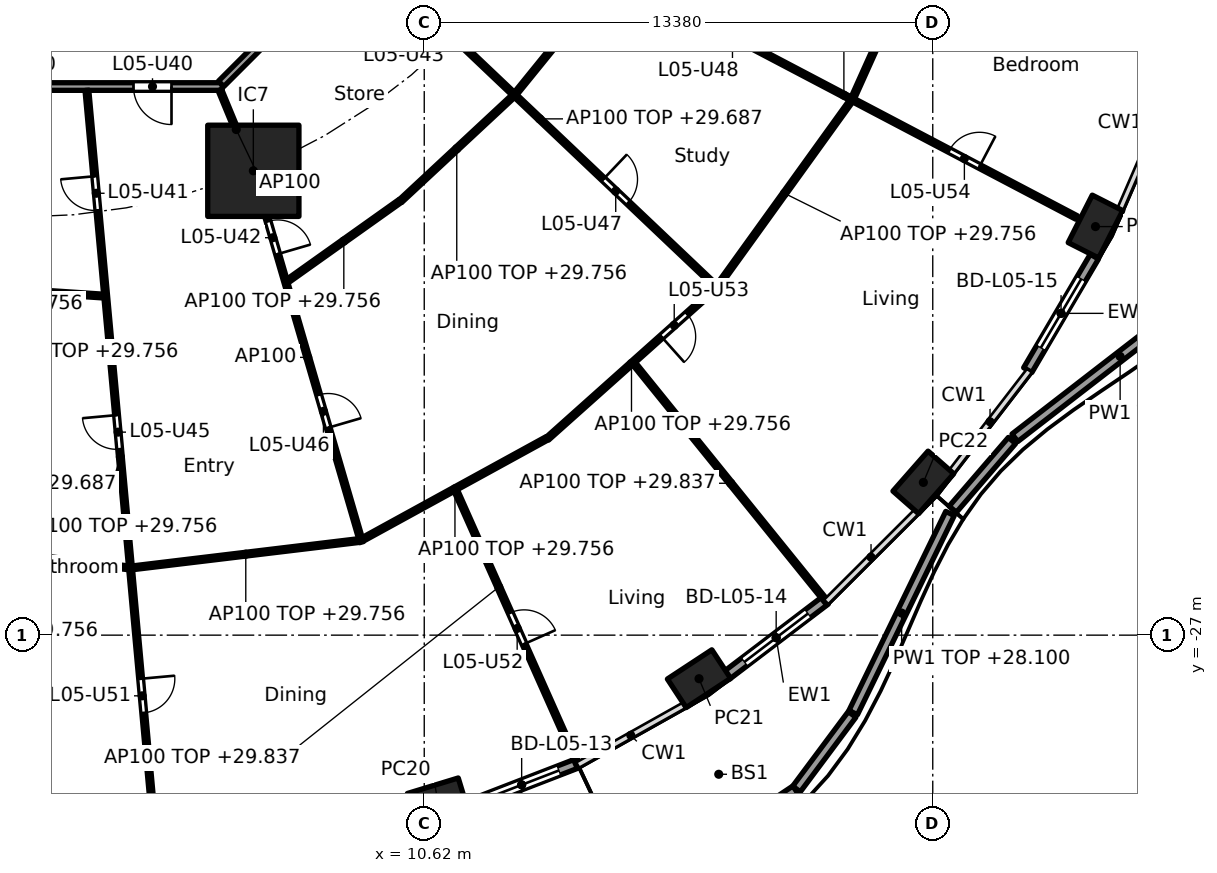
"""IFC4 building model, lengths in metres.
Left out: names, types, materials, properties, quantities, classifications, styles, units other than length and angle.
Written with IfcOpenShell. Run it as: python <this file> out.ifc"""

import sys

from ifc_helpers import new_model, si_unit, direction, frame, frame_2d, origin, origin_2d, place, context, subcontext, project, spatial, rectangle, hollow_rectangle, extrude, element, fill, save


model = new_model("IFC4")
c1 = context("Model", 3, precision=1e-05, world=origin(), true_north=direction((0.0, 1.0)))
c2 = subcontext(c1, "Body", "Model", "MODEL_VIEW")
j1 = project(units=[si_unit("LENGTHUNIT", "METRE"), si_unit("PLANEANGLEUNIT", "RADIAN")], contexts=[c1])
p1 = place(None, origin())
s1 = spatial("IfcSite", under=j1, at=p1, CompositionType="ELEMENT")
p2 = place(p1, origin())
s2 = spatial("IfcBuilding", under=s1, at=p2, CompositionType="ELEMENT")
p3 = place(p2, frame((0.0, 0.0, 27.0)))
s3 = spatial("IfcBuildingStorey", under=s2, at=p3, CompositionType="ELEMENT", Elevation=27.0)
for number, where, z_axis, x_axis in (
    (1, (10.976, -31.393, 0.0), (0.0, 0.0, 1.0), (0.957, 0.292, 0.0)),
    (2, (17.85, -28.146, 0.0), (0.0, 0.0, 1.0), (0.836, 0.549, 0.0)),
    (3, (23.752, -22.981, 0.0), (0.0, 0.0, 1.0), (0.66, 0.751, 0.0)),
    (4, (28.282, -16.25, 0.0), (0.0, 0.0, 1.0), (0.452, 0.892, 0.0)),
):
    element("IfcColumn", number, at=place(p3, frame(where, z_axis=z_axis, x_axis=x_axis)), inside=s3, PredefinedType="COLUMN", context=c2, shape_type="SweptSolid", body=[
        extrude(hollow_rectangle(XDim=1.4, YDim=0.9, WallThickness=0.05, at=origin_2d()), origin(), (0.0, 0.0, 1.0), 3.7),
    ])
p4 = place(p3, frame((6.123, -14.782, 0.0), z_axis=(0.0, 0.0, 1.0), x_axis=(1.0, 0.0, 0.0)))
e5 = element("IfcColumn", 5, at=p4, inside=s3, PredefinedType="COLUMN", context=c2, shape_type="SweptSolid", body=[
    extrude(rectangle(XDim=2.4, YDim=2.4, at=origin_2d()), origin(), (0.0, 0.0, 1.0), 3.7),
])
p5 = place(p3, frame((14.653, -30.371, 0.0), z_axis=(0.0, 0.0, 1.0), x_axis=(-0.932809381943, -0.360370166577, 0.0)))
e6 = element("IfcWall", 6, at=p5, inside=s3, PredefinedType="SOLIDWALL", context=c2, shape_type="SweptSolid", body=[
    extrude(rectangle(XDim=3.151, YDim=0.25, at=frame_2d((1.575, 0.0))), origin(), (0.0, 0.0, 1.0), 3.44),
])
p6 = place(p5, frame((0.525, 0.0, 0.0)))
e7 = element("IfcOpeningElement", 7, at=p6, cuts=e6, PredefinedType="OPENING", context=c2, shape_type="SweptSolid", body=[
    extrude(rectangle(XDim=2.1, YDim=2.4, at=frame_2d((1.05, 1.2))), frame((0.0, 0.135, 0.0), z_axis=(0.0, -1.0, 0.0), x_axis=(1.0, 0.0, 0.0)), (0.0, 0.0, 1.0), 0.27),
])
p7 = place(p3, frame((21.178, -26.081, 0.0), z_axis=(0.0, 0.0, 1.0), x_axis=(-0.796022293214, -0.605267303517, 0.0)))
e8 = element("IfcWall", 8, at=p7, inside=s3, PredefinedType="SOLIDWALL", context=c2, shape_type="SweptSolid", body=[
    extrude(rectangle(XDim=3.262, YDim=0.25, at=frame_2d((1.631, 0.0))), origin(), (0.0, 0.0, 1.0), 3.44),
])
p8 = place(p7, frame((0.581, 0.0, 0.0)))
e9 = element("IfcOpeningElement", 9, at=p8, cuts=e8, PredefinedType="OPENING", context=c2, shape_type="SweptSolid", body=[
    extrude(rectangle(XDim=2.1, YDim=2.4, at=frame_2d((1.05, 1.2))), frame((0.0, 0.135, 0.0), z_axis=(0.0, -1.0, 0.0), x_axis=(1.0, 0.0, 0.0)), (0.0, 0.0, 1.0), 0.27),
])
p9 = place(p3, frame((28.252, -17.04, 0.0), z_axis=(0.0, 0.0, 1.0), x_axis=(-0.506311160839, -0.862350861546, 0.0)))
e10 = element("IfcWall", 10, at=p9, inside=s3, PredefinedType="SOLIDWALL", context=c2, shape_type="SweptSolid", body=[
    extrude(rectangle(XDim=3.462, YDim=0.25, at=frame_2d((1.731, 0.0))), origin(), (0.0, 0.0, 1.0), 3.44),
])
p10 = place(p9, frame((0.681, 0.0, 0.0)))
e11 = element("IfcOpeningElement", 11, at=p10, cuts=e10, PredefinedType="OPENING", context=c2, shape_type="SweptSolid", body=[
    extrude(rectangle(XDim=2.1, YDim=2.4, at=frame_2d((1.05, 1.2))), frame((0.0, 0.135, 0.0), z_axis=(0.0, -1.0, 0.0), x_axis=(1.0, 0.0, 0.0)), (0.0, 0.0, 1.0), 0.27),
])
p11 = place(p3, frame((18.428, -32.379, 0.0), z_axis=(0.0, 0.0, 1.0), x_axis=(0.832193744061, 0.554484961334, 0.0)))
e12 = element("IfcWall", 12, at=p11, inside=s3, PredefinedType="PARAPET", context=c2, shape_type="SweptSolid", body=[
    extrude(rectangle(XDim=2.356, YDim=0.25, at=frame_2d((1.178, 0.0))), origin(), (0.0, 0.0, 1.0), 1.1),
])
p12 = place(p3, frame((20.415, -31.048, 0.0), z_axis=(0.0, 0.0, 1.0), x_axis=(0.597715227752, 0.80170849223, 0.0)))
e13 = element("IfcWall", 13, at=p12, inside=s3, PredefinedType="PARAPET", context=c2, shape_type="SweptSolid", body=[
    extrude(rectangle(XDim=2.448, YDim=0.25, at=frame_2d((1.224, 0.0))), origin(), (0.0, 0.0, 1.0), 1.1),
])
p13 = place(p3, frame((21.907, -29.038, 0.0), z_axis=(0.0, 0.0, 1.0), x_axis=(0.437296277374, 0.899317499994, 0.0)))
e14 = element("IfcWall", 14, at=p13, inside=s3, PredefinedType="PARAPET", context=c2, shape_type="SweptSolid", body=[
    extrude(rectangle(XDim=5.826, YDim=0.25, at=frame_2d((2.913, 0.0))), origin(), (0.0, 0.0, 1.0), 1.1),
])
p14 = place(p3, frame((24.527, -23.688, 0.0), z_axis=(0.0, 0.0, 1.0), x_axis=(0.652642199991, 0.757666258184, 0.0)))
e15 = element("IfcWall", 15, at=p14, inside=s3, PredefinedType="PARAPET", context=c2, shape_type="SweptSolid", body=[
    extrude(rectangle(XDim=2.387, YDim=0.25, at=frame_2d((1.194, 0.0))), origin(), (0.0, 0.0, 1.0), 1.1),
])
p15 = place(p3, frame((26.161, -21.807, 0.0), z_axis=(0.0, 0.0, 1.0), x_axis=(0.791260452579, 0.611479268811, 0.0)))
e16 = element("IfcWall", 16, at=p15, inside=s3, PredefinedType="PARAPET", context=c2, shape_type="SweptSolid", body=[
    extrude(rectangle(XDim=6.999, YDim=0.25, at=frame_2d((3.5, 0.0))), origin(), (0.0, 0.0, 1.0), 1.1),
])
p16 = place(p3, frame((-5.104, -12.565, 0.0), z_axis=(0.0, 0.0, 1.0), x_axis=(1.0, 0.0, 0.0)))
e17 = element("IfcWall", 17, at=p16, inside=s3, PredefinedType="PARTITIONING", context=c2, shape_type="SweptSolid", body=[
    extrude(rectangle(XDim=10.409, YDim=0.2, at=frame_2d((5.205, 0.0))), origin(), (0.0, 0.0, 1.0), 3.44),
])
p17 = place(p16, frame((8.074, 0.0, 0.0)))
e18 = element("IfcOpeningElement", 18, at=p17, cuts=e17, PredefinedType="OPENING", context=c2, shape_type="SweptSolid", body=[
    extrude(rectangle(XDim=1.0, YDim=2.1, at=frame_2d((0.5, 1.05))), frame((0.0, 0.11, 0.0), z_axis=(0.0, -1.0, 0.0), x_axis=(1.0, 0.0, 0.0)), (0.0, 0.0, 1.0), 0.22),
])
p18 = place(p3, frame((5.275, -12.494, 0.0), z_axis=(0.0, 0.0, 1.0), x_axis=(0.707106781187, 0.707106781187, 0.0)))
e19 = element("IfcWall", 19, at=p18, inside=s3, PredefinedType="PARTITIONING", context=c2, shape_type="SweptSolid", body=[
    extrude(rectangle(XDim=10.409, YDim=0.2, at=frame_2d((5.205, 0.0))), origin(), (0.0, 0.0, 1.0), 3.44),
])
p19 = place(p3, frame((-2.271, -17.782, 0.0), z_axis=(0.0, 0.0, 1.0), x_axis=(0.997791437766, -0.066424744789, 0.0)))
e20 = element("IfcWall", 20, at=p19, inside=s3, PredefinedType="PARTITIONING", context=c2, shape_type="SweptSolid", body=[
    extrude(rectangle(XDim=4.469, YDim=0.1, at=frame_2d((2.235, 0.0))), origin(), (0.0, 0.0, 1.0), 2.756),
])
p20 = place(p3, frame((-3.031, -24.543, 0.0), z_axis=(0.0, 0.0, 1.0), x_axis=(0.993255612046, -0.115945198862, 0.0)))
e21 = element("IfcWall", 21, at=p20, inside=s3, PredefinedType="PARTITIONING", context=c2, shape_type="SweptSolid", body=[
    extrude(rectangle(XDim=5.913, YDim=0.1, at=frame_2d((2.956, 0.0))), origin(), (0.0, 0.0, 1.0), 2.756),
])
p21 = place(p20, frame((1.028, 0.0, 0.0)))
e22 = element("IfcOpeningElement", 22, at=p21, cuts=e21, PredefinedType="OPENING", context=c2, shape_type="SweptSolid", body=[
    extrude(rectangle(XDim=0.9, YDim=2.1, at=frame_2d((0.45, 1.05))), frame((0.0, 0.06, 0.0), z_axis=(0.0, -1.0, 0.0), x_axis=(1.0, 0.0, 0.0)), (0.0, 0.0, 1.0), 0.12),
])
p22 = place(p3, frame((1.744, -12.664, 0.0), z_axis=(0.0, 0.0, 1.0), x_axis=(0.090893639596, -0.995860605849, 0.0)))
e23 = element("IfcWall", 23, at=p22, inside=s3, PredefinedType="PARTITIONING", context=c2, shape_type="SweptSolid", body=[
    extrude(rectangle(XDim=19.374, YDim=0.1, at=frame_2d((9.687, 0.0))), origin(), (0.0, 0.0, 1.0), 2.687),
])
p23 = place(p22, frame((2.27, 0.0, 0.0)))
e24 = element("IfcOpeningElement", 24, at=p23, cuts=e23, PredefinedType="OPENING", context=c2, shape_type="SweptSolid", body=[
    extrude(rectangle(XDim=0.9, YDim=2.1, at=frame_2d((0.45, 1.05))), frame((0.0, 0.06, 0.0), z_axis=(0.0, -1.0, 0.0), x_axis=(1.0, 0.0, 0.0)), (0.0, 0.0, 1.0), 0.12),
])
p24 = place(p22, frame((8.582, 0.0, 0.0)))
e25 = element("IfcOpeningElement", 25, at=p24, cuts=e23, PredefinedType="OPENING", context=c2, shape_type="SweptSolid", body=[
    extrude(rectangle(XDim=0.9, YDim=2.1, at=frame_2d((0.45, 1.05))), frame((0.0, 0.06, 0.0), z_axis=(0.0, -1.0, 0.0), x_axis=(1.0, 0.0, 0.0)), (0.0, 0.0, 1.0), 0.12),
])
p25 = place(p22, frame((15.548, 0.0, 0.0)))
e26 = element("IfcOpeningElement", 26, at=p25, cuts=e23, PredefinedType="OPENING", context=c2, shape_type="SweptSolid", body=[
    extrude(rectangle(XDim=0.9, YDim=2.1, at=frame_2d((0.45, 1.05))), frame((0.0, 0.06, 0.0), z_axis=(0.0, -1.0, 0.0), x_axis=(1.0, 0.0, 0.0)), (0.0, 0.0, 1.0), 0.12),
])
p26 = place(p3, frame((2.941, -25.229, 0.0), z_axis=(0.0, 0.0, 1.0), x_axis=(0.992836798252, 0.119478416615, 0.0)))
e27 = element("IfcWall", 27, at=p26, inside=s3, PredefinedType="PARTITIONING", context=c2, shape_type="SweptSolid", body=[
    extrude(rectangle(XDim=6.01, YDim=0.1, at=frame_2d((3.005, 0.0))), origin(), (0.0, 0.0, 1.0), 2.756),
])
p27 = place(p3, frame((5.243, -12.657, 0.0), z_axis=(0.0, 0.0, 1.0), x_axis=(0.382719158442, -0.923864733477, 0.0)))
e28 = element("IfcWall", 28, at=p27, inside=s3, PredefinedType="PARTITIONING", context=c2, shape_type="SweptSolid", body=[
    extrude(rectangle(XDim=2.25, YDim=0.1, at=frame_2d((1.125, 0.0))), origin(), (0.0, 0.0, 1.0), 3.44),
])
p28 = place(p3, frame((6.137, -14.83, 0.0), z_axis=(0.0, 0.0, 1.0), x_axis=(0.279843546189, -0.960045618529, 0.0)))
e29 = element("IfcWall", 29, at=p28, inside=s3, PredefinedType="PARTITIONING", context=c2, shape_type="SweptSolid", body=[
    extrude(rectangle(XDim=10.127, YDim=0.1, at=frame_2d((5.063, 0.0))), origin(), (0.0, 0.0, 1.0), 3.44),
])
p29 = place(p28, frame((1.334, 0.0, 0.0)))
e30 = element("IfcOpeningElement", 30, at=p29, cuts=e29, PredefinedType="OPENING", context=c2, shape_type="SweptSolid", body=[
    extrude(rectangle(XDim=0.9, YDim=2.1, at=frame_2d((0.45, 1.05))), frame((0.0, 0.06, 0.0), z_axis=(0.0, -1.0, 0.0), x_axis=(1.0, 0.0, 0.0)), (0.0, 0.0, 1.0), 0.12),
])
p30 = place(p28, frame((6.091, 0.0, 0.0)))
e31 = element("IfcOpeningElement", 31, at=p30, cuts=e29, PredefinedType="OPENING", context=c2, shape_type="SweptSolid", body=[
    extrude(rectangle(XDim=0.9, YDim=2.1, at=frame_2d((0.45, 1.05))), frame((0.0, 0.06, 0.0), z_axis=(0.0, -1.0, 0.0), x_axis=(1.0, 0.0, 0.0)), (0.0, 0.0, 1.0), 0.12),
])
p31 = place(p3, frame((7.019, -17.686, 0.0), z_axis=(0.0, 0.0, 1.0), x_axis=(0.81494477814, 0.57953861699, 0.0)))
e32 = element("IfcWall", 32, at=p31, inside=s3, PredefinedType="PARTITIONING", context=c2, shape_type="SweptSolid", body=[
    extrude(rectangle(XDim=3.644, YDim=0.1, at=frame_2d((1.822, 0.0))), origin(), (0.0, 0.0, 1.0), 2.756),
])
p32 = place(p3, frame((9.001, -24.48, 0.0), z_axis=(0.0, 0.0, 1.0), x_axis=(0.876794415294, 0.480865421203, 0.0)))
e33 = element("IfcWall", 33, at=p32, inside=s3, PredefinedType="PARTITIONING", context=c2, shape_type="SweptSolid", body=[
    extrude(rectangle(XDim=5.536, YDim=0.1, at=frame_2d((2.768, 0.0))), origin(), (0.0, 0.0, 1.0), 2.756),
])
p33 = place(p3, frame((11.448, -23.195, 0.0), z_axis=(0.0, 0.0, 1.0), x_axis=(0.407016520798, -0.913420796675, 0.0)))
e34 = element("IfcWall", 34, at=p33, inside=s3, PredefinedType="PARTITIONING", context=c2, shape_type="SweptSolid", body=[
    extrude(rectangle(XDim=7.944, YDim=0.1, at=frame_2d((3.972, 0.0))), origin(), (0.0, 0.0, 1.0), 2.837),
])
p34 = place(p33, frame((3.522, 0.0, 0.0)))
e35 = element("IfcOpeningElement", 35, at=p34, cuts=e34, PredefinedType="OPENING", context=c2, shape_type="SweptSolid", body=[
    extrude(rectangle(XDim=0.9, YDim=2.1, at=frame_2d((0.45, 1.05))), frame((0.0, 0.06, 0.0), z_axis=(0.0, -1.0, 0.0), x_axis=(1.0, 0.0, 0.0)), (0.0, 0.0, 1.0), 0.12),
])
p35 = place(p3, frame((9.993, -15.579, 0.0), z_axis=(0.0, 0.0, 1.0), x_axis=(0.732028724098, 0.681273768096, 0.0)))
e36 = element("IfcWall", 36, at=p35, inside=s3, PredefinedType="PARTITIONING", context=c2, shape_type="SweptSolid", body=[
    extrude(rectangle(XDim=4.05, YDim=0.1, at=frame_2d((2.025, 0.0))), origin(), (0.0, 0.0, 1.0), 2.756),
])
p36 = place(p3, frame((13.862, -21.828, 0.0), z_axis=(0.0, 0.0, 1.0), x_axis=(0.745812746724, 0.666155647596, 0.0)))
e37 = element("IfcWall", 37, at=p36, inside=s3, PredefinedType="PARTITIONING", context=c2, shape_type="SweptSolid", body=[
    extrude(rectangle(XDim=5.931, YDim=0.1, at=frame_2d((2.965, 0.0))), origin(), (0.0, 0.0, 1.0), 2.756),
])
p37 = place(p36, frame((4.023, 0.0, 0.0)))
e38 = element("IfcOpeningElement", 38, at=p37, cuts=e37, PredefinedType="OPENING", context=c2, shape_type="SweptSolid", body=[
    extrude(rectangle(XDim=0.9, YDim=2.1, at=frame_2d((0.45, 1.05))), frame((0.0, 0.06, 0.0), z_axis=(0.0, -1.0, 0.0), x_axis=(1.0, 0.0, 0.0)), (0.0, 0.0, 1.0), 0.12),
])
p38 = place(p3, frame((16.142, -19.858, 0.0), z_axis=(0.0, 0.0, 1.0), x_axis=(0.628738066508, -0.777617157555, 0.0)))
e39 = element("IfcWall", 39, at=p38, inside=s3, PredefinedType="PARTITIONING", context=c2, shape_type="SweptSolid", body=[
    extrude(rectangle(XDim=8.091, YDim=0.1, at=frame_2d((4.045, 0.0))), origin(), (0.0, 0.0, 1.0), 2.837),
])
p39 = place(p3, frame((8.957, -8.953, 0.0), z_axis=(0.0, 0.0, 1.0), x_axis=(0.725250022034, -0.688485588476, 0.0)))
e40 = element("IfcWall", 40, at=p39, inside=s3, PredefinedType="PARTITIONING", context=c2, shape_type="SweptSolid", body=[
    extrude(rectangle(XDim=12.963, YDim=0.1, at=frame_2d((6.481, 0.0))), origin(), (0.0, 0.0, 1.0), 2.687),
])
p40 = place(p39, frame((2.333, 0.0, 0.0)))
e41 = element("IfcOpeningElement", 41, at=p40, cuts=e40, PredefinedType="OPENING", context=c2, shape_type="SweptSolid", body=[
    extrude(rectangle(XDim=0.9, YDim=2.1, at=frame_2d((0.45, 1.05))), frame((0.0, 0.06, 0.0), z_axis=(0.0, -1.0, 0.0), x_axis=(1.0, 0.0, 0.0)), (0.0, 0.0, 1.0), 0.12),
])
p41 = place(p39, frame((8.79, 0.0, 0.0)))
e42 = element("IfcOpeningElement", 42, at=p41, cuts=e40, PredefinedType="OPENING", context=c2, shape_type="SweptSolid", body=[
    extrude(rectangle(XDim=0.9, YDim=2.1, at=frame_2d((0.45, 1.05))), frame((0.0, 0.06, 0.0), z_axis=(0.0, -1.0, 0.0), x_axis=(1.0, 0.0, 0.0)), (0.0, 0.0, 1.0), 0.12),
])
p42 = place(p3, frame((13.026, -12.747, 0.0), z_axis=(0.0, 0.0, 1.0), x_axis=(0.630126826288, 0.776492229705, 0.0)))
e43 = element("IfcWall", 43, at=p42, inside=s3, PredefinedType="PARTITIONING", context=c2, shape_type="SweptSolid", body=[
    extrude(rectangle(XDim=4.007, YDim=0.1, at=frame_2d((2.003, 0.0))), origin(), (0.0, 0.0, 1.0), 2.756),
])
p43 = place(p3, frame((18.351, -17.803, 0.0), z_axis=(0.0, 0.0, 1.0), x_axis=(0.584563700282, 0.811347817099, 0.0)))
e44 = element("IfcWall", 44, at=p43, inside=s3, PredefinedType="PARTITIONING", context=c2, shape_type="SweptSolid", body=[
    extrude(rectangle(XDim=5.984, YDim=0.1, at=frame_2d((2.992, 0.0))), origin(), (0.0, 0.0, 1.0), 2.756),
])
p44 = place(p3, frame((15.538, -9.574, 0.0), z_axis=(0.0, 0.0, 1.0), x_axis=(0.885181406501, -0.465246039838, 0.0)))
e45 = element("IfcWall", 45, at=p44, inside=s3, PredefinedType="PARTITIONING", context=c2, shape_type="SweptSolid", body=[
    extrude(rectangle(XDim=13.837, YDim=0.1, at=frame_2d((6.918, 0.0))), origin(), (0.0, 0.0, 1.0), 2.756),
])
p45 = place(p44, frame((3.156, 0.0, 0.0)))
e46 = element("IfcOpeningElement", 46, at=p45, cuts=e45, PredefinedType="OPENING", context=c2, shape_type="SweptSolid", body=[
    extrude(rectangle(XDim=0.9, YDim=2.1, at=frame_2d((0.45, 1.05))), frame((0.0, 0.06, 0.0), z_axis=(0.0, -1.0, 0.0), x_axis=(1.0, 0.0, 0.0)), (0.0, 0.0, 1.0), 0.12),
])
p46 = place(p44, frame((10.05, 0.0, 0.0)))
e47 = element("IfcOpeningElement", 47, at=p46, cuts=e45, PredefinedType="OPENING", context=c2, shape_type="SweptSolid", body=[
    extrude(rectangle(XDim=0.9, YDim=2.1, at=frame_2d((0.45, 1.05))), frame((0.0, 0.06, 0.0), z_axis=(0.0, -1.0, 0.0), x_axis=(1.0, 0.0, 0.0)), (0.0, 0.0, 1.0), 0.12),
])
p47 = place(p3, frame((21.899, -12.861, 0.0), z_axis=(0.0, 0.0, 1.0), x_axis=(0.410201529109, 0.911994904326, 0.0)))
e48 = element("IfcWall", 48, at=p47, inside=s3, PredefinedType="PARTITIONING", context=c2, shape_type="SweptSolid", body=[
    extrude(rectangle(XDim=5.787, YDim=0.1, at=frame_2d((2.894, 0.0))), origin(), (0.0, 0.0, 1.0), 2.756),
])
p48 = place(p6, origin())
e49 = element("IfcDoor", 49, at=p48, inside=s3, OperationType="SLIDING_TO_LEFT", PredefinedType="DOOR", context=c2, shape_type="SweptSolid", body=[
    extrude(rectangle(XDim=2.1, YDim=2.4, at=frame_2d((1.05, 1.2))), frame((0.0, 0.025, 0.0), z_axis=(0.0, -1.0, 0.0), x_axis=(1.0, 0.0, 0.0)), (0.0, 0.0, 1.0), 0.05),
])
fill(e7, e49)
p49 = place(p8, origin())
e50 = element("IfcDoor", 50, at=p49, inside=s3, OperationType="SLIDING_TO_LEFT", PredefinedType="DOOR", context=c2, shape_type="SweptSolid", body=[
    extrude(rectangle(XDim=2.1, YDim=2.4, at=frame_2d((1.05, 1.2))), frame((0.0, 0.025, 0.0), z_axis=(0.0, -1.0, 0.0), x_axis=(1.0, 0.0, 0.0)), (0.0, 0.0, 1.0), 0.05),
])
fill(e9, e50)
p50 = place(p10, origin())
e51 = element("IfcDoor", 51, at=p50, inside=s3, OperationType="SLIDING_TO_LEFT", PredefinedType="DOOR", context=c2, shape_type="SweptSolid", body=[
    extrude(rectangle(XDim=2.1, YDim=2.4, at=frame_2d((1.05, 1.2))), frame((0.0, 0.025, 0.0), z_axis=(0.0, -1.0, 0.0), x_axis=(1.0, 0.0, 0.0)), (0.0, 0.0, 1.0), 0.05),
])
fill(e11, e51)
p51 = place(p3, frame((0.0, 0.0, -0.25)))
p52 = place(p51, frame((26.121, -31.755, 0.0), z_axis=(0.0, 0.0, 1.0), x_axis=(0.753265007301, 0.657717134319, 0.0)))
p53 = place(p52, frame((0.0, 0.0, 0.2)))
e52 = element("IfcWindow", 52, at=p53, inside=s3, PartitioningType="SINGLE_PANEL", PredefinedType="SKYLIGHT", context=c2, shape_type="SweptSolid", body=[
    extrude(rectangle(XDim=5.0, YDim=2.0, at=origin_2d()), origin(), (0.0, 0.0, 1.0), 1.25),
])
p54 = place(p17, frame((1.0, 0.0, 0.0), x_axis=(-1.0, 0.0, 0.0)))
e53 = element("IfcDoor", 53, at=p54, inside=s3, OperationType="SINGLE_SWING_LEFT", PredefinedType="DOOR", context=c2, shape_type="SweptSolid", body=[
    extrude(rectangle(XDim=1.0, YDim=2.1, at=frame_2d((0.5, 1.05))), frame((0.0, 0.025, 0.0), z_axis=(0.0, -1.0, 0.0), x_axis=(1.0, 0.0, 0.0)), (0.0, 0.0, 1.0), 0.05),
])
fill(e18, e53)
p55 = place(p23, frame((0.9, 0.0, 0.0), x_axis=(-1.0, 0.0, 0.0)))
e54 = element("IfcDoor", 54, at=p55, inside=s3, OperationType="SINGLE_SWING_RIGHT", PredefinedType="DOOR", context=c2, shape_type="SweptSolid", body=[
    extrude(rectangle(XDim=0.9, YDim=2.1, at=frame_2d((0.45, 1.05))), frame((0.0, 0.025, 0.0), z_axis=(0.0, -1.0, 0.0), x_axis=(1.0, 0.0, 0.0)), (0.0, 0.0, 1.0), 0.05),
])
fill(e24, e54)
p56 = place(p29, origin())
e55 = element("IfcDoor", 55, at=p56, inside=s3, OperationType="SINGLE_SWING_RIGHT", PredefinedType="DOOR", context=c2, shape_type="SweptSolid", body=[
    extrude(rectangle(XDim=0.9, YDim=2.1, at=frame_2d((0.45, 1.05))), frame((0.0, 0.025, 0.0), z_axis=(0.0, -1.0, 0.0), x_axis=(1.0, 0.0, 0.0)), (0.0, 0.0, 1.0), 0.05),
])
fill(e30, e55)
p57 = place(p24, frame((0.9, 0.0, 0.0), x_axis=(-1.0, 0.0, 0.0)))
e56 = element("IfcDoor", 56, at=p57, inside=s3, OperationType="SINGLE_SWING_RIGHT", PredefinedType="DOOR", context=c2, shape_type="SweptSolid", body=[
    extrude(rectangle(XDim=0.9, YDim=2.1, at=frame_2d((0.45, 1.05))), frame((0.0, 0.025, 0.0), z_axis=(0.0, -1.0, 0.0), x_axis=(1.0, 0.0, 0.0)), (0.0, 0.0, 1.0), 0.05),
])
fill(e25, e56)
p58 = place(p30, origin())
e57 = element("IfcDoor", 57, at=p58, inside=s3, OperationType="SINGLE_SWING_RIGHT", PredefinedType="DOOR", context=c2, shape_type="SweptSolid", body=[
    extrude(rectangle(XDim=0.9, YDim=2.1, at=frame_2d((0.45, 1.05))), frame((0.0, 0.025, 0.0), z_axis=(0.0, -1.0, 0.0), x_axis=(1.0, 0.0, 0.0)), (0.0, 0.0, 1.0), 0.05),
])
fill(e31, e57)
p59 = place(p41, origin())
e58 = element("IfcDoor", 58, at=p59, inside=s3, OperationType="SINGLE_SWING_LEFT", PredefinedType="DOOR", context=c2, shape_type="SweptSolid", body=[
    extrude(rectangle(XDim=0.9, YDim=2.1, at=frame_2d((0.45, 1.05))), frame((0.0, 0.025, 0.0), z_axis=(0.0, -1.0, 0.0), x_axis=(1.0, 0.0, 0.0)), (0.0, 0.0, 1.0), 0.05),
])
fill(e42, e58)
p60 = place(p25, origin())
e59 = element("IfcDoor", 59, at=p60, inside=s3, OperationType="SINGLE_SWING_LEFT", PredefinedType="DOOR", context=c2, shape_type="SweptSolid", body=[
    extrude(rectangle(XDim=0.9, YDim=2.1, at=frame_2d((0.45, 1.05))), frame((0.0, 0.025, 0.0), z_axis=(0.0, -1.0, 0.0), x_axis=(1.0, 0.0, 0.0)), (0.0, 0.0, 1.0), 0.05),
])
fill(e26, e59)
p61 = place(p34, origin())
e60 = element("IfcDoor", 60, at=p61, inside=s3, OperationType="SINGLE_SWING_RIGHT", PredefinedType="DOOR", context=c2, shape_type="SweptSolid", body=[
    extrude(rectangle(XDim=0.9, YDim=2.1, at=frame_2d((0.45, 1.05))), frame((0.0, 0.025, 0.0), z_axis=(0.0, -1.0, 0.0), x_axis=(1.0, 0.0, 0.0)), (0.0, 0.0, 1.0), 0.05),
])
fill(e35, e60)
p62 = place(p37, frame((0.9, 0.0, 0.0), x_axis=(-1.0, 0.0, 0.0)))
e61 = element("IfcDoor", 61, at=p62, inside=s3, OperationType="SINGLE_SWING_RIGHT", PredefinedType="DOOR", context=c2, shape_type="SweptSolid", body=[
    extrude(rectangle(XDim=0.9, YDim=2.1, at=frame_2d((0.45, 1.05))), frame((0.0, 0.025, 0.0), z_axis=(0.0, -1.0, 0.0), x_axis=(1.0, 0.0, 0.0)), (0.0, 0.0, 1.0), 0.05),
])
fill(e38, e61)
p63 = place(p46, origin())
e62 = element("IfcDoor", 62, at=p63, inside=s3, OperationType="SINGLE_SWING_RIGHT", PredefinedType="DOOR", context=c2, shape_type="SweptSolid", body=[
    extrude(rectangle(XDim=0.9, YDim=2.1, at=frame_2d((0.45, 1.05))), frame((0.0, 0.025, 0.0), z_axis=(0.0, -1.0, 0.0), x_axis=(1.0, 0.0, 0.0)), (0.0, 0.0, 1.0), 0.05),
])
fill(e47, e62)
save(model, sys.argv[1])
